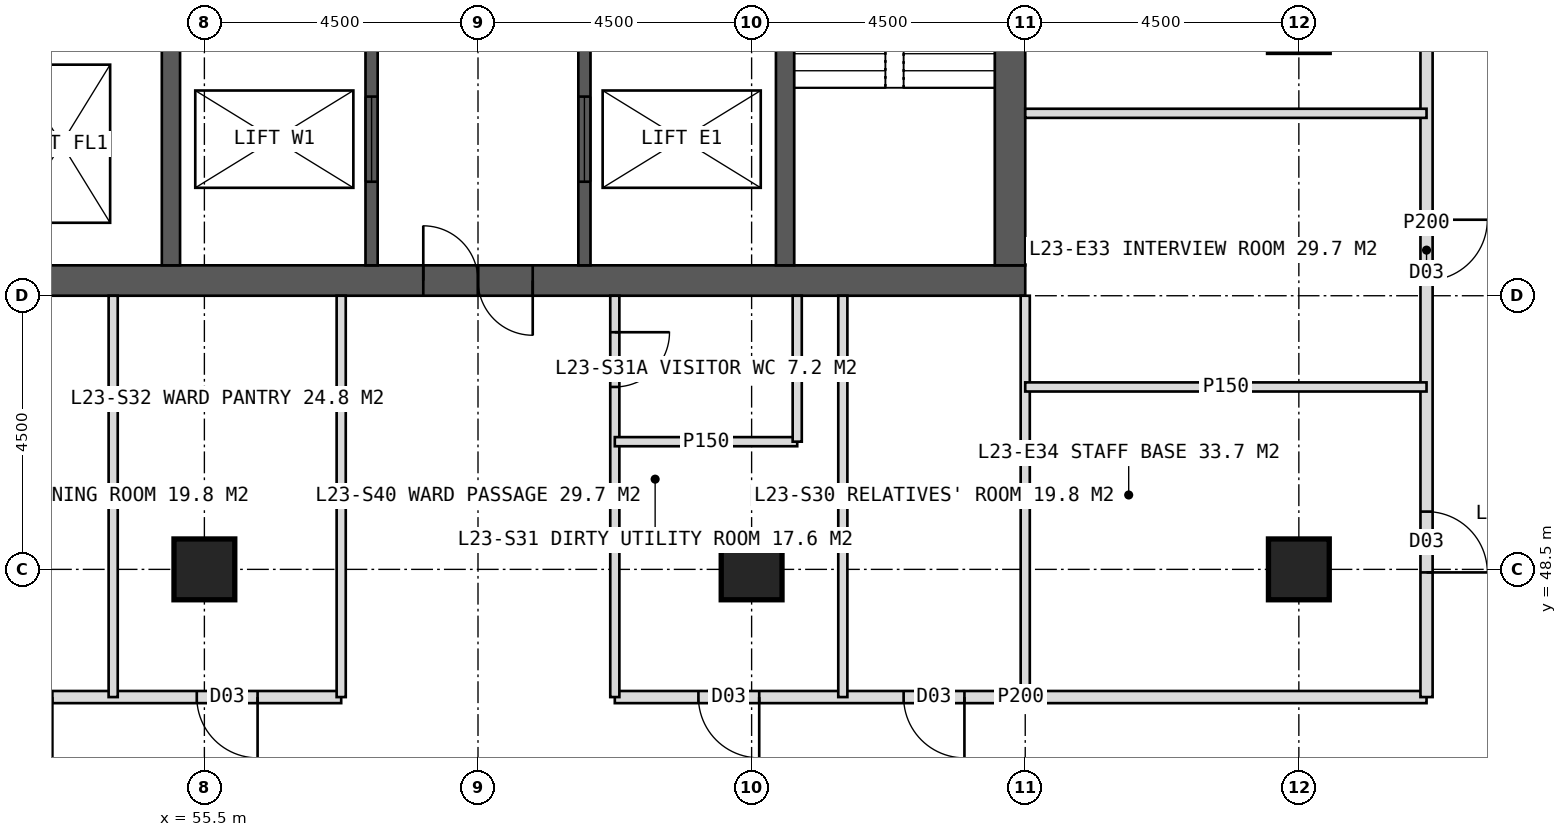
"""IFC4 building model, lengths in metres.
Left out: names, types, materials, properties, quantities, classifications, styles, units other than length and angle.
Written with IfcOpenShell. Run it as: python <this file> out.ifc"""

import sys

from ifc_helpers import new_model, si_unit, direction, frame, frame_2d, origin, origin_2d, place, context, subcontext, project, spatial, rectangle, hollow_rectangle, extrude, element, fill, save


model = new_model("IFC4")
c1 = context("Model", 3, precision=1e-05, world=origin(), true_north=direction((0.0, 1.0)))
c2 = subcontext(c1, "Body", "Model", "MODEL_VIEW")
j1 = project(units=[si_unit("LENGTHUNIT", "METRE"), si_unit("PLANEANGLEUNIT", "RADIAN")], contexts=[c1])
p1 = place(None, origin())
s1 = spatial("IfcSite", under=j1, at=p1, CompositionType="ELEMENT")
p2 = place(p1, origin())
s2 = spatial("IfcBuilding", under=s1, at=p2, CompositionType="ELEMENT")
p3 = place(p2, frame((0.0, 0.0, 100.0)))
s3 = spatial("IfcBuildingStorey", under=s2, at=p3, CompositionType="ELEMENT", Elevation=100.0)
p4 = place(p3, frame((51.0, 53.25, 0.0), z_axis=(0.0, 0.0, 1.0), x_axis=(1.0, 0.0, 0.0)))
e1 = element("IfcWall", 1, at=p4, inside=s3, PredefinedType="SHEAR", context=c2, shape_type="SweptSolid", body=[
    extrude(rectangle(XDim=18.0, YDim=0.5, at=frame_2d((9.0, 0.0))), origin(), (0.0, 0.0, 1.0), 4.0),
])
p5 = place(p4, frame((8.1, 0.0, 0.0)))
e2 = element("IfcOpeningElement", 2, at=p5, cuts=e1, PredefinedType="OPENING", context=c2, shape_type="SweptSolid", body=[
    extrude(rectangle(XDim=1.8, YDim=2.2, at=frame_2d((0.9, 1.1))), frame((0.0, 0.26, 0.0), z_axis=(0.0, -1.0, 0.0), x_axis=(1.0, 0.0, 0.0)), (0.0, 0.0, 1.0), 0.52),
])
p6 = place(p3, frame((68.75, 53.5, 0.0), z_axis=(0.0, 0.0, 1.0), x_axis=(0.0, 1.0, 0.0)))
e3 = element("IfcWall", 3, at=p6, inside=s3, PredefinedType="SHEAR", context=c2, shape_type="SweptSolid", body=[
    extrude(rectangle(XDim=17.0, YDim=0.5, at=frame_2d((8.5, 0.0))), origin(), (0.0, 0.0, 1.0), 4.0),
])
p7 = place(p6, frame((9.5, 0.0, 0.0)))
e4 = element("IfcOpeningElement", 4, at=p7, cuts=e3, PredefinedType="OPENING", context=c2, shape_type="SweptSolid", body=[
    extrude(rectangle(XDim=1.5, YDim=2.2, at=frame_2d((0.75, 1.1))), frame((0.0, 0.26, 0.0), z_axis=(0.0, -1.0, 0.0), x_axis=(1.0, 0.0, 0.0)), (0.0, 0.0, 1.0), 0.52),
])
for number, where, z_axis, x_axis in (
    (5, (54.95, 53.5, 0.0), (0.0, 0.0, 1.0), (0.0, 1.0, 0.0)),
    (6, (65.05, 53.5, 0.0), (0.0, 0.0, 1.0), (0.0, 1.0, 0.0)),
):
    element("IfcWall", number, at=place(p3, frame(where, z_axis=z_axis, x_axis=x_axis)), inside=s3, PredefinedType="SHEAR", context=c2, shape_type="SweptSolid", body=[
        extrude(rectangle(XDim=17.0, YDim=0.3, at=frame_2d((8.5, 0.0))), origin(), (0.0, 0.0, 1.0), 4.0),
    ])
p8 = place(p3, frame((58.25, 53.5, 0.0), z_axis=(0.0, 0.0, 1.0), x_axis=(0.0, 1.0, 0.0)))
e7 = element("IfcWall", 7, at=p8, inside=s3, PredefinedType="SHEAR", context=c2, shape_type="SweptSolid", body=[
    extrude(rectangle(XDim=17.0, YDim=0.2, at=frame_2d((8.5, 0.0))), origin(), (0.0, 0.0, 1.0), 4.0),
])
p9 = place(p8, frame((1.375, 0.0, 0.0)))
e8 = element("IfcOpeningElement", 8, at=p9, cuts=e7, PredefinedType="OPENING", context=c2, shape_type="SweptSolid", body=[
    extrude(rectangle(XDim=1.4, YDim=2.2, at=frame_2d((0.7, 1.1))), frame((0.0, 0.11, 0.0), z_axis=(0.0, -1.0, 0.0), x_axis=(1.0, 0.0, 0.0)), (0.0, 0.0, 1.0), 0.22),
])
p10 = place(p8, frame((5.675, 0.0, 0.0)))
e9 = element("IfcOpeningElement", 9, at=p10, cuts=e7, PredefinedType="OPENING", context=c2, shape_type="SweptSolid", body=[
    extrude(rectangle(XDim=1.4, YDim=2.2, at=frame_2d((0.7, 1.1))), frame((0.0, 0.11, 0.0), z_axis=(0.0, -1.0, 0.0), x_axis=(1.0, 0.0, 0.0)), (0.0, 0.0, 1.0), 0.22),
])
p11 = place(p3, frame((61.75, 53.5, 0.0), z_axis=(0.0, 0.0, 1.0), x_axis=(0.0, 1.0, 0.0)))
e10 = element("IfcWall", 10, at=p11, inside=s3, PredefinedType="SHEAR", context=c2, shape_type="SweptSolid", body=[
    extrude(rectangle(XDim=17.0, YDim=0.2, at=frame_2d((8.5, 0.0))), origin(), (0.0, 0.0, 1.0), 4.0),
])
p12 = place(p11, frame((1.375, 0.0, 0.0)))
e11 = element("IfcOpeningElement", 11, at=p12, cuts=e10, PredefinedType="OPENING", context=c2, shape_type="SweptSolid", body=[
    extrude(rectangle(XDim=1.4, YDim=2.2, at=frame_2d((0.7, 1.1))), frame((0.0, 0.11, 0.0), z_axis=(0.0, -1.0, 0.0), x_axis=(1.0, 0.0, 0.0)), (0.0, 0.0, 1.0), 0.22),
])
p13 = place(p11, frame((5.675, 0.0, 0.0)))
e12 = element("IfcOpeningElement", 12, at=p13, cuts=e10, PredefinedType="OPENING", context=c2, shape_type="SweptSolid", body=[
    extrude(rectangle(XDim=1.4, YDim=2.2, at=frame_2d((0.7, 1.1))), frame((0.0, 0.11, 0.0), z_axis=(0.0, -1.0, 0.0), x_axis=(1.0, 0.0, 0.0)), (0.0, 0.0, 1.0), 0.22),
])
for number, where, z_axis, x_axis in (
    (13, (73.5, 48.5, 0.0), (0.0, 0.0, 1.0), (1.0, 0.0, 0.0)),
    (14, (55.5, 48.5, 0.0), (0.0, 0.0, 1.0), (1.0, 0.0, 0.0)),
    (15, (64.5, 48.5, 0.0), (0.0, 0.0, 1.0), (1.0, 0.0, 0.0)),
):
    element("IfcColumn", number, at=place(p3, frame(where, z_axis=z_axis, x_axis=x_axis)), inside=s3, PredefinedType="COLUMN", context=c2, shape_type="SweptSolid", body=[
        extrude(hollow_rectangle(XDim=1.0, YDim=1.0, WallThickness=0.1, at=origin_2d()), origin(), (0.0, 0.0, 1.0), 4.0),
    ])
p14 = place(p3, frame((69.0, 53.0, 0.0), z_axis=(0.0, 0.0, 1.0), x_axis=(0.0, -1.0, 0.0)))
e16 = element("IfcWall", 16, at=p14, inside=s3, PredefinedType="PARTITIONING", context=c2, shape_type="SweptSolid", body=[
    extrude(rectangle(XDim=6.6, YDim=0.15, at=frame_2d((3.3, 0.0))), origin(), (0.0, 0.0, 1.0), 3.75),
])
p15 = place(p3, frame((75.6, 46.4, 0.0), z_axis=(0.0, 0.0, 1.0), x_axis=(-1.0, 0.0, 0.0)))
e17 = element("IfcWall", 17, at=p15, inside=s3, PredefinedType="PARTITIONING", context=c2, shape_type="SweptSolid", body=[
    extrude(rectangle(XDim=13.35, YDim=0.2, at=frame_2d((6.675, 0.0))), origin(), (0.0, 0.0, 1.0), 3.75),
])
p16 = place(p15, frame((7.6, 0.0, 0.0)))
e18 = element("IfcOpeningElement", 18, at=p16, cuts=e17, PredefinedType="OPENING", context=c2, shape_type="SweptSolid", body=[
    extrude(rectangle(XDim=1.0, YDim=2.1, at=frame_2d((0.5, 1.05))), frame((0.0, 0.11, 0.0), z_axis=(0.0, -1.0, 0.0), x_axis=(1.0, 0.0, 0.0)), (0.0, 0.0, 1.0), 0.22),
])
p17 = place(p15, frame((10.975, 0.0, 0.0)))
e19 = element("IfcOpeningElement", 19, at=p17, cuts=e17, PredefinedType="OPENING", context=c2, shape_type="SweptSolid", body=[
    extrude(rectangle(XDim=1.0, YDim=2.1, at=frame_2d((0.5, 1.05))), frame((0.0, 0.11, 0.0), z_axis=(0.0, -1.0, 0.0), x_axis=(1.0, 0.0, 0.0)), (0.0, 0.0, 1.0), 0.22),
])
p18 = place(p3, frame((57.75, 46.4, 0.0), z_axis=(0.0, 0.0, 1.0), x_axis=(-1.0, 0.0, 0.0)))
e20 = element("IfcWall", 20, at=p18, inside=s3, PredefinedType="PARTITIONING", context=c2, shape_type="SweptSolid", body=[
    extrude(rectangle(XDim=13.35, YDim=0.2, at=frame_2d((6.675, 0.0))), origin(), (0.0, 0.0, 1.0), 3.75),
])
p19 = place(p18, frame((1.375, 0.0, 0.0)))
e21 = element("IfcOpeningElement", 21, at=p19, cuts=e20, PredefinedType="OPENING", context=c2, shape_type="SweptSolid", body=[
    extrude(rectangle(XDim=1.0, YDim=2.1, at=frame_2d((0.5, 1.05))), frame((0.0, 0.11, 0.0), z_axis=(0.0, -1.0, 0.0), x_axis=(1.0, 0.0, 0.0)), (0.0, 0.0, 1.0), 0.22),
])
p20 = place(p18, frame((4.75, 0.0, 0.0)))
e22 = element("IfcOpeningElement", 22, at=p20, cuts=e20, PredefinedType="OPENING", context=c2, shape_type="SweptSolid", body=[
    extrude(rectangle(XDim=1.0, YDim=2.1, at=frame_2d((0.5, 1.05))), frame((0.0, 0.11, 0.0), z_axis=(0.0, -1.0, 0.0), x_axis=(1.0, 0.0, 0.0)), (0.0, 0.0, 1.0), 0.22),
])
p21 = place(p18, frame((9.55, 0.0, 0.0)))
e23 = element("IfcOpeningElement", 23, at=p21, cuts=e20, PredefinedType="OPENING", context=c2, shape_type="SweptSolid", body=[
    extrude(rectangle(XDim=1.0, YDim=2.1, at=frame_2d((0.5, 1.05))), frame((0.0, 0.11, 0.0), z_axis=(0.0, -1.0, 0.0), x_axis=(1.0, 0.0, 0.0)), (0.0, 0.0, 1.0), 0.22),
])
p22 = place(p3, frame((62.25, 53.0, 0.0), z_axis=(0.0, 0.0, 1.0), x_axis=(0.0, -1.0, 0.0)))
e24 = element("IfcWall", 24, at=p22, inside=s3, PredefinedType="PARTITIONING", context=c2, shape_type="SweptSolid", body=[
    extrude(rectangle(XDim=6.6, YDim=0.15, at=frame_2d((3.3, 0.0))), origin(), (0.0, 0.0, 1.0), 3.75),
])
p23 = place(p22, frame((0.6, 0.0, 0.0)))
e25 = element("IfcOpeningElement", 25, at=p23, cuts=e24, PredefinedType="OPENING", context=c2, shape_type="SweptSolid", body=[
    extrude(rectangle(XDim=0.9, YDim=2.1, at=frame_2d((0.45, 1.05))), frame((0.0, 0.085, 0.0), z_axis=(0.0, -1.0, 0.0), x_axis=(1.0, 0.0, 0.0)), (0.0, 0.0, 1.0), 0.17),
])
for number, where, z_axis, x_axis in (
    (26, (57.75, 53.0, 0.0), (0.0, 0.0, 1.0), (0.0, -1.0, 0.0)),
    (27, (66.0, 53.0, 0.0), (0.0, 0.0, 1.0), (0.0, -1.0, 0.0)),
    (28, (54.0, 53.0, 0.0), (0.0, 0.0, 1.0), (0.0, -1.0, 0.0)),
):
    element("IfcWall", number, at=place(p3, frame(where, z_axis=z_axis, x_axis=x_axis)), inside=s3, PredefinedType="PARTITIONING", context=c2, shape_type="SweptSolid", body=[
        extrude(rectangle(XDim=6.6, YDim=0.15, at=frame_2d((3.3, 0.0))), origin(), (0.0, 0.0, 1.0), 3.75),
    ])
p24 = place(p3, frame((65.25, 50.6, 0.0), z_axis=(0.0, 0.0, 1.0), x_axis=(-1.0, 0.0, 0.0)))
e29 = element("IfcWall", 29, at=p24, inside=s3, PredefinedType="PARTITIONING", context=c2, shape_type="SweptSolid", body=[
    extrude(rectangle(XDim=3.0, YDim=0.15, at=frame_2d((1.5, 0.0))), origin(), (0.0, 0.0, 1.0), 3.75),
])
p25 = place(p3, frame((65.25, 53.0, 0.0), z_axis=(0.0, 0.0, 1.0), x_axis=(0.0, -1.0, 0.0)))
e30 = element("IfcWall", 30, at=p25, inside=s3, PredefinedType="PARTITIONING", context=c2, shape_type="SweptSolid", body=[
    extrude(rectangle(XDim=2.4, YDim=0.15, at=frame_2d((1.2, 0.0))), origin(), (0.0, 0.0, 1.0), 3.75),
])
p26 = place(p3, frame((75.6, 62.0, 0.0), z_axis=(0.0, 0.0, 1.0), x_axis=(0.0, -1.0, 0.0)))
e31 = element("IfcWall", 31, at=p26, inside=s3, PredefinedType="PARTITIONING", context=c2, shape_type="SweptSolid", body=[
    extrude(rectangle(XDim=15.6, YDim=0.2, at=frame_2d((7.8, 0.0))), origin(), (0.0, 0.0, 1.0), 3.75),
])
p27 = place(p26, frame((2.5, 0.0, 0.0)))
e32 = element("IfcOpeningElement", 32, at=p27, cuts=e31, PredefinedType="OPENING", context=c2, shape_type="SweptSolid", body=[
    extrude(rectangle(XDim=1.0, YDim=2.1, at=frame_2d((0.5, 1.05))), frame((0.0, 0.11, 0.0), z_axis=(0.0, -1.0, 0.0), x_axis=(1.0, 0.0, 0.0)), (0.0, 0.0, 1.0), 0.22),
])
p28 = place(p26, frame((7.75, 0.0, 0.0)))
e33 = element("IfcOpeningElement", 33, at=p28, cuts=e31, PredefinedType="OPENING", context=c2, shape_type="SweptSolid", body=[
    extrude(rectangle(XDim=1.0, YDim=2.1, at=frame_2d((0.5, 1.05))), frame((0.0, 0.11, 0.0), z_axis=(0.0, -1.0, 0.0), x_axis=(1.0, 0.0, 0.0)), (0.0, 0.0, 1.0), 0.22),
])
p29 = place(p26, frame((12.55, 0.0, 0.0)))
e34 = element("IfcOpeningElement", 34, at=p29, cuts=e31, PredefinedType="OPENING", context=c2, shape_type="SweptSolid", body=[
    extrude(rectangle(XDim=1.0, YDim=2.1, at=frame_2d((0.5, 1.05))), frame((0.0, 0.11, 0.0), z_axis=(0.0, -1.0, 0.0), x_axis=(1.0, 0.0, 0.0)), (0.0, 0.0, 1.0), 0.22),
])
for number, where, z_axis, x_axis in (
    (35, (69.0, 56.0, 0.0), (0.0, 0.0, 1.0), (1.0, 0.0, 0.0)),
    (36, (69.0, 51.5, 0.0), (0.0, 0.0, 1.0), (1.0, 0.0, 0.0)),
):
    element("IfcWall", number, at=place(p3, frame(where, z_axis=z_axis, x_axis=x_axis)), inside=s3, PredefinedType="PARTITIONING", context=c2, shape_type="SweptSolid", body=[
        extrude(rectangle(XDim=6.6, YDim=0.15, at=frame_2d((3.3, 0.0))), origin(), (0.0, 0.0, 1.0), 3.75),
    ])
p30 = place(p16, origin())
e37 = element("IfcDoor", 37, at=p30, inside=s3, OperationType="SINGLE_SWING_LEFT", PredefinedType="DOOR", context=c2, shape_type="SweptSolid", body=[
    extrude(rectangle(XDim=1.0, YDim=2.1, at=frame_2d((0.5, 1.05))), frame((0.0, 0.025, 0.0), z_axis=(0.0, -1.0, 0.0), x_axis=(1.0, 0.0, 0.0)), (0.0, 0.0, 1.0), 0.05),
])
fill(e18, e37)
p31 = place(p23, origin())
e38 = element("IfcDoor", 38, at=p31, inside=s3, OperationType="SINGLE_SWING_LEFT", PredefinedType="DOOR", context=c2, shape_type="SweptSolid", body=[
    extrude(rectangle(XDim=0.9, YDim=2.1, at=frame_2d((0.45, 1.05))), frame((0.0, 0.025, 0.0), z_axis=(0.0, -1.0, 0.0), x_axis=(1.0, 0.0, 0.0)), (0.0, 0.0, 1.0), 0.05),
])
fill(e25, e38)
p32 = place(p17, origin())
e39 = element("IfcDoor", 39, at=p32, inside=s3, OperationType="SINGLE_SWING_LEFT", PredefinedType="DOOR", context=c2, shape_type="SweptSolid", body=[
    extrude(rectangle(XDim=1.0, YDim=2.1, at=frame_2d((0.5, 1.05))), frame((0.0, 0.025, 0.0), z_axis=(0.0, -1.0, 0.0), x_axis=(1.0, 0.0, 0.0)), (0.0, 0.0, 1.0), 0.05),
])
fill(e19, e39)
p33 = place(p19, origin())
e40 = element("IfcDoor", 40, at=p33, inside=s3, OperationType="SINGLE_SWING_LEFT", PredefinedType="DOOR", context=c2, shape_type="SweptSolid", body=[
    extrude(rectangle(XDim=1.0, YDim=2.1, at=frame_2d((0.5, 1.05))), frame((0.0, 0.025, 0.0), z_axis=(0.0, -1.0, 0.0), x_axis=(1.0, 0.0, 0.0)), (0.0, 0.0, 1.0), 0.05),
])
fill(e21, e40)
p34 = place(p28, origin())
e41 = element("IfcDoor", 41, at=p34, inside=s3, OperationType="SINGLE_SWING_LEFT", PredefinedType="DOOR", context=c2, shape_type="SweptSolid", body=[
    extrude(rectangle(XDim=1.0, YDim=2.1, at=frame_2d((0.5, 1.05))), frame((0.0, 0.025, 0.0), z_axis=(0.0, -1.0, 0.0), x_axis=(1.0, 0.0, 0.0)), (0.0, 0.0, 1.0), 0.05),
])
fill(e33, e41)
p35 = place(p29, origin())
e42 = element("IfcDoor", 42, at=p35, inside=s3, OperationType="SINGLE_SWING_RIGHT", PredefinedType="DOOR", context=c2, shape_type="SweptSolid", body=[
    extrude(rectangle(XDim=1.0, YDim=2.1, at=frame_2d((0.5, 1.05))), frame((0.0, 0.025, 0.0), z_axis=(0.0, -1.0, 0.0), x_axis=(1.0, 0.0, 0.0)), (0.0, 0.0, 1.0), 0.05),
])
fill(e34, e42)
p36 = place(p5, origin())
e43 = element("IfcDoor", 43, at=p36, inside=s3, OperationType="DOUBLE_DOOR_SINGLE_SWING", PredefinedType="DOOR", context=c2, shape_type="SweptSolid", body=[
    extrude(rectangle(XDim=1.8, YDim=2.2, at=frame_2d((0.9, 1.1))), frame((0.0, 0.025, 0.0), z_axis=(0.0, -1.0, 0.0), x_axis=(1.0, 0.0, 0.0)), (0.0, 0.0, 1.0), 0.05),
])
fill(e2, e43)
p37 = place(p9, origin())
e44 = element("IfcDoor", 44, at=p37, inside=s3, OperationType="SLIDING_TO_LEFT", PredefinedType="DOOR", context=c2, shape_type="SweptSolid", body=[
    extrude(rectangle(XDim=1.4, YDim=2.2, at=frame_2d((0.7, 1.1))), frame((0.0, 0.025, 0.0), z_axis=(0.0, -1.0, 0.0), x_axis=(1.0, 0.0, 0.0)), (0.0, 0.0, 1.0), 0.05),
])
fill(e8, e44)
p38 = place(p12, origin())
e45 = element("IfcDoor", 45, at=p38, inside=s3, OperationType="SLIDING_TO_LEFT", PredefinedType="DOOR", context=c2, shape_type="SweptSolid", body=[
    extrude(rectangle(XDim=1.4, YDim=2.2, at=frame_2d((0.7, 1.1))), frame((0.0, 0.025, 0.0), z_axis=(0.0, -1.0, 0.0), x_axis=(1.0, 0.0, 0.0)), (0.0, 0.0, 1.0), 0.05),
])
fill(e11, e45)
save(model, sys.argv[1])
